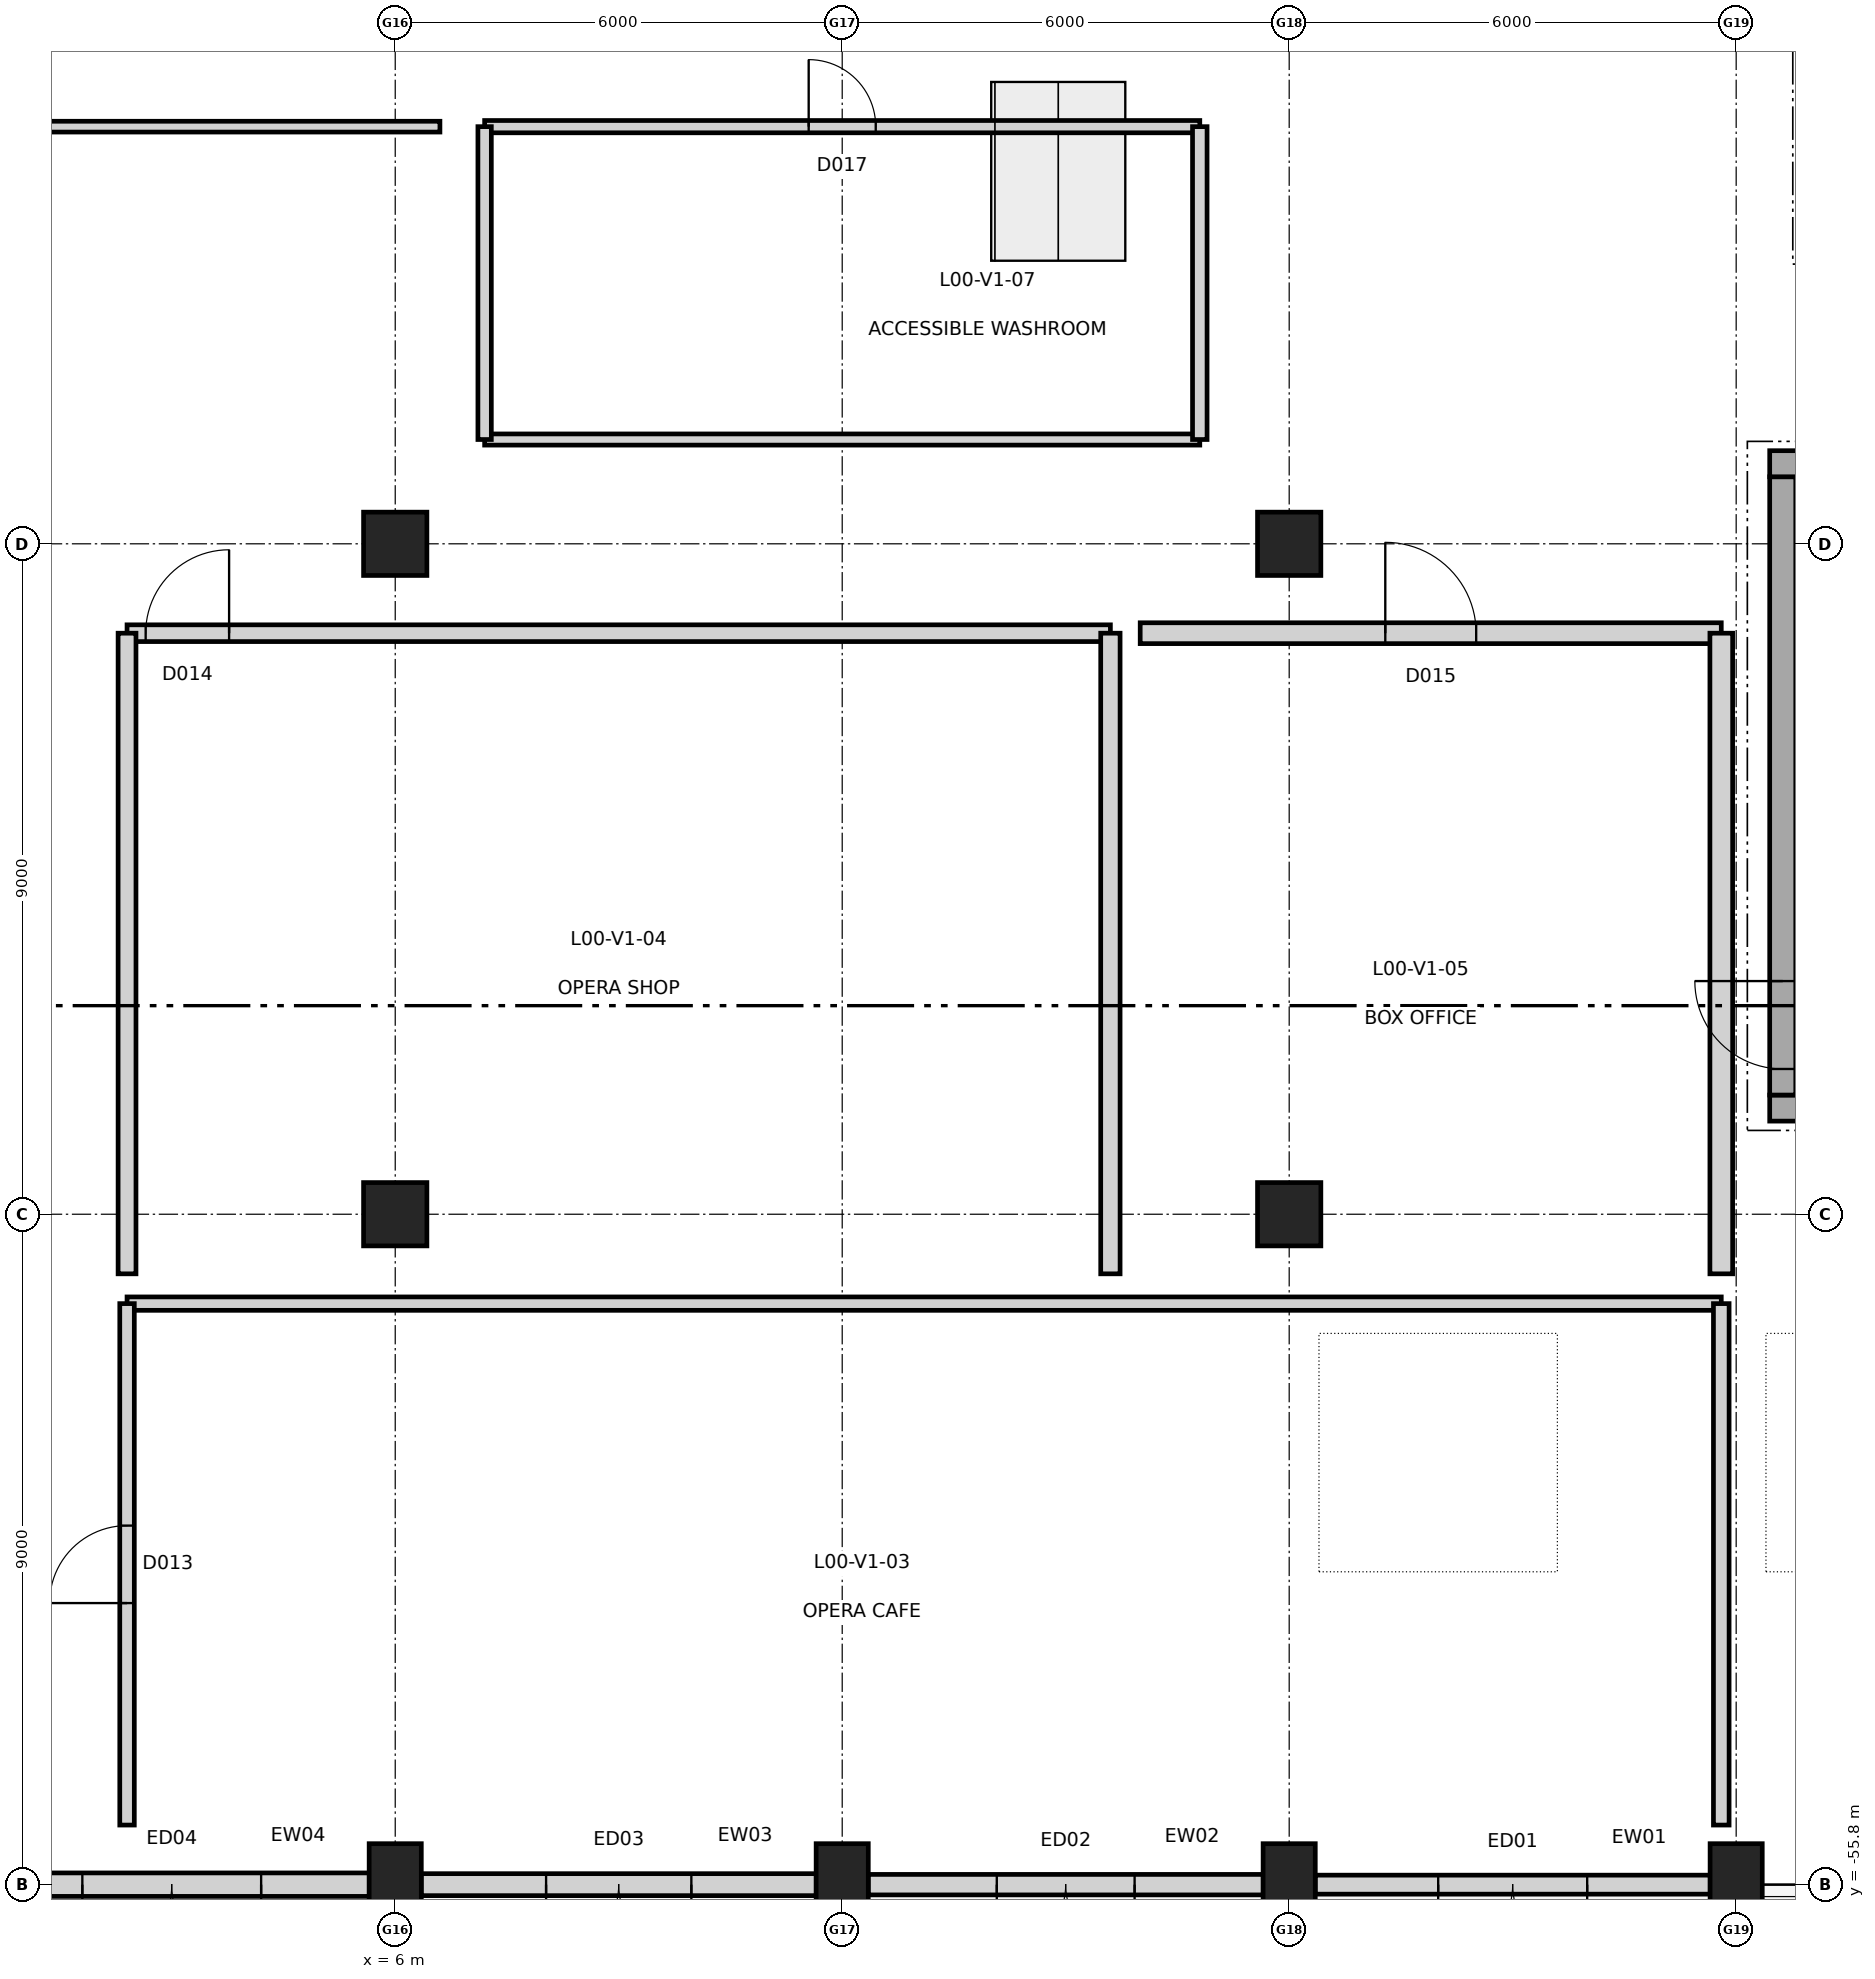
"""IFC4 building model, lengths in metres.
Left out: names, types, materials, properties, quantities, classifications, styles, units other than length and angle.
Written with IfcOpenShell. Run it as: python <this file> out.ifc"""

import sys

from ifc_helpers import new_model, si_unit, direction, frame, frame_2d, origin, origin_2d, place, context, subcontext, project, spatial, rectangle, circle, extrude, element, fill, save


model = new_model("IFC4")
c1 = context("Model", 3, precision=1e-05, world=origin(), true_north=direction((0.0, 1.0)))
c2 = subcontext(c1, "Body", "Model", "MODEL_VIEW")
j1 = project(units=[si_unit("LENGTHUNIT", "METRE"), si_unit("PLANEANGLEUNIT", "RADIAN")], contexts=[c1])
p1 = place(None, origin())
s1 = spatial("IfcSite", under=j1, at=p1, CompositionType="ELEMENT")
p2 = place(p1, origin())
s2 = spatial("IfcBuilding", under=s1, at=p2, CompositionType="ELEMENT")
p3 = place(p2, origin())
s3 = spatial("IfcBuildingStorey", under=s2, at=p3, CompositionType="ELEMENT", Elevation=0.0)
p4 = place(p3, frame((6.0, -55.8, 0.0), z_axis=(0.0, 0.0, 1.0), x_axis=(1.0, 0.0, 0.0)))
e1 = element("IfcColumn", 1, at=p4, inside=s3, PredefinedType="COLUMN", context=c2, shape_type="SweptSolid", body=[
    extrude(rectangle(XDim=0.7, YDim=1.1, at=origin_2d()), origin(), (0.0, 0.0, 1.0), 5.4),
])
for number, where, z_axis, x_axis in (
    (2, (6.0, -46.8, 0.0), (0.0, 0.0, 1.0), (1.0, 0.0, 0.0)),
    (3, (6.0, -37.8, 0.0), (0.0, 0.0, 1.0), (1.0, 0.0, 0.0)),
):
    element("IfcColumn", number, at=place(p3, frame(where, z_axis=z_axis, x_axis=x_axis)), inside=s3, PredefinedType="COLUMN", context=c2, shape_type="SweptSolid", body=[
        extrude(circle(Radius=0.425, at=origin_2d()), origin(), (0.0, 0.0, 1.0), 5.4),
    ])
for number, where, z_axis, x_axis in (
    (4, (12.0, -55.8, 0.0), (0.0, 0.0, 1.0), (1.0, 0.0, 0.0)),
    (5, (18.0, -55.8, 0.0), (0.0, 0.0, 1.0), (1.0, 0.0, 0.0)),
):
    element("IfcColumn", number, at=place(p3, frame(where, z_axis=z_axis, x_axis=x_axis)), inside=s3, PredefinedType="COLUMN", context=c2, shape_type="SweptSolid", body=[
        extrude(rectangle(XDim=0.7, YDim=1.1, at=origin_2d()), origin(), (0.0, 0.0, 1.0), 5.4),
    ])
for number, where, z_axis, x_axis in (
    (6, (18.0, -46.8, 0.0), (0.0, 0.0, 1.0), (1.0, 0.0, 0.0)),
    (7, (18.0, -37.8, 0.0), (0.0, 0.0, 1.0), (1.0, 0.0, 0.0)),
):
    element("IfcColumn", number, at=place(p3, frame(where, z_axis=z_axis, x_axis=x_axis)), inside=s3, PredefinedType="COLUMN", context=c2, shape_type="SweptSolid", body=[
        extrude(circle(Radius=0.425, at=origin_2d()), origin(), (0.0, 0.0, 1.0), 5.4),
    ])
p5 = place(p3, frame((24.0, -55.8, 0.0), z_axis=(0.0, 0.0, 1.0), x_axis=(1.0, 0.0, 0.0)))
e8 = element("IfcColumn", 8, at=p5, inside=s3, PredefinedType="COLUMN", context=c2, shape_type="SweptSolid", body=[
    extrude(rectangle(XDim=0.7, YDim=1.1, at=origin_2d()), origin(), (0.0, 0.0, 1.0), 5.4),
])
p6 = place(p3, frame((23.652, -55.8, 0.0), z_axis=(0.0, 0.0, 1.0), x_axis=(-1.0, 0.0, 0.0)))
e9 = element("IfcWall", 9, at=p6, inside=s3, PredefinedType="STANDARD", context=c2, shape_type="SweptSolid", body=[
    extrude(rectangle(XDim=5.304, YDim=0.255, at=frame_2d((2.652, 0.0))), origin(), (0.0, 0.0, 1.0), 4.32),
])
p7 = place(p6, frame((1.652, 0.0, 0.0)))
e10 = element("IfcOpeningElement", 10, at=p7, cuts=e9, PredefinedType="OPENING", context=c2, shape_type="SweptSolid", body=[
    extrude(rectangle(XDim=2.0, YDim=2.4, at=frame_2d((1.0, 1.2))), frame((0.0, 0.137, 0.0), z_axis=(0.0, -1.0, 0.0), x_axis=(1.0, 0.0, 0.0)), (0.0, 0.0, 1.0), 0.275),
])
p8 = place(p3, frame((17.652, -55.8, 0.0), z_axis=(0.0, 0.0, 1.0), x_axis=(-1.0, 0.0, 0.0)))
e11 = element("IfcWall", 11, at=p8, inside=s3, PredefinedType="STANDARD", context=c2, shape_type="SweptSolid", body=[
    extrude(rectangle(XDim=5.304, YDim=0.275, at=frame_2d((2.652, 0.0))), origin(), (0.0, 0.0, 1.0), 4.32),
])
p9 = place(p8, frame((1.727, 0.0, 0.0)))
e12 = element("IfcOpeningElement", 12, at=p9, cuts=e11, PredefinedType="OPENING", context=c2, shape_type="SweptSolid", body=[
    extrude(rectangle(XDim=1.85, YDim=2.25, at=frame_2d((0.925, 1.125))), frame((0.0, 0.147, 0.0), z_axis=(0.0, -1.0, 0.0), x_axis=(1.0, 0.0, 0.0)), (0.0, 0.0, 1.0), 0.295),
])
p10 = place(p3, frame((11.652, -55.8, 0.0), z_axis=(0.0, 0.0, 1.0), x_axis=(-1.0, 0.0, 0.0)))
e13 = element("IfcWall", 13, at=p10, inside=s3, PredefinedType="STANDARD", context=c2, shape_type="SweptSolid", body=[
    extrude(rectangle(XDim=5.304, YDim=0.295, at=frame_2d((2.652, 0.0))), origin(), (0.0, 0.0, 1.0), 4.32),
])
p11 = place(p10, frame((1.677, 0.0, 0.0)))
e14 = element("IfcOpeningElement", 14, at=p11, cuts=e13, PredefinedType="OPENING", context=c2, shape_type="SweptSolid", body=[
    extrude(rectangle(XDim=1.95, YDim=2.35, at=frame_2d((0.975, 1.175))), frame((0.0, 0.157, 0.0), z_axis=(0.0, -1.0, 0.0), x_axis=(1.0, 0.0, 0.0)), (0.0, 0.0, 1.0), 0.315),
])
p12 = place(p3, frame((5.652, -55.8, 0.0), z_axis=(0.0, 0.0, 1.0), x_axis=(-1.0, 0.0, 0.0)))
e15 = element("IfcWall", 15, at=p12, inside=s3, PredefinedType="STANDARD", context=c2, shape_type="SweptSolid", body=[
    extrude(rectangle(XDim=5.304, YDim=0.315, at=frame_2d((2.652, 0.0))), origin(), (0.0, 0.0, 1.0), 4.32),
])
p13 = place(p12, frame((1.452, 0.0, 0.0)))
e16 = element("IfcOpeningElement", 16, at=p13, cuts=e15, PredefinedType="OPENING", context=c2, shape_type="SweptSolid", body=[
    extrude(rectangle(XDim=2.4, YDim=2.5, at=frame_2d((1.2, 1.25))), frame((0.0, 0.167, 0.0), z_axis=(0.0, -1.0, 0.0), x_axis=(1.0, 0.0, 0.0)), (0.0, 0.0, 1.0), 0.335),
])
p14 = place(p3, frame((29.05, -45.375, 0.0), z_axis=(0.0, 0.0, 1.0), x_axis=(-1.0, 0.0, 0.0)))
e17 = element("IfcWall", 17, at=p14, inside=s3, PredefinedType="SHEAR", context=c2, shape_type="SweptSolid", body=[
    extrude(rectangle(XDim=4.6, YDim=0.35, at=frame_2d((2.3, 0.0))), origin(), (0.0, 0.0, 1.0), 5.4),
])
p15 = place(p3, frame((24.625, -45.2, 0.0), z_axis=(0.0, 0.0, 1.0), x_axis=(0.0, 1.0, 0.0)))
e18 = element("IfcWall", 18, at=p15, inside=s3, PredefinedType="SHEAR", context=c2, shape_type="SweptSolid", body=[
    extrude(rectangle(XDim=8.3, YDim=0.35, at=frame_2d((4.15, 0.0))), origin(), (0.0, 0.0, 1.0), 5.4),
])
p16 = place(p15, frame((0.35, 0.0, 0.0)))
e19 = element("IfcOpeningElement", 19, at=p16, cuts=e18, PredefinedType="OPENING", context=c2, shape_type="SweptSolid", body=[
    extrude(rectangle(XDim=1.18, YDim=2.15, at=frame_2d((0.59, 1.075))), frame((0.0, 0.185, 0.0), z_axis=(0.0, -1.0, 0.0), x_axis=(1.0, 0.0, 0.0)), (0.0, 0.0, 1.0), 0.37),
])
p17 = place(p3, frame((24.45, -36.725, 0.0), z_axis=(0.0, 0.0, 1.0), x_axis=(1.0, 0.0, 0.0)))
e20 = element("IfcWall", 20, at=p17, inside=s3, PredefinedType="SHEAR", context=c2, shape_type="SweptSolid", body=[
    extrude(rectangle(XDim=4.6, YDim=0.35, at=frame_2d((2.3, 0.0))), origin(), (0.0, 0.0, 1.0), 5.4),
])
p18 = place(p3, frame((2.4, -48.0, 0.0), z_axis=(0.0, 0.0, 1.0), x_axis=(1.0, 0.0, 0.0)))
e21 = element("IfcWall", 21, at=p18, inside=s3, PredefinedType="PARTITIONING", context=c2, shape_type="SweptSolid", body=[
    extrude(rectangle(XDim=21.4, YDim=0.18, at=frame_2d((10.7, 0.0))), origin(), (0.0, 0.0, 1.0), 5.02),
])
p19 = place(p3, frame((2.4, -55.0, 0.0), z_axis=(0.0, 0.0, 1.0), x_axis=(0.0, 1.0, 0.0)))
e22 = element("IfcWall", 22, at=p19, inside=s3, PredefinedType="PARTITIONING", context=c2, shape_type="SweptSolid", body=[
    extrude(rectangle(XDim=7.0, YDim=0.195, at=frame_2d((3.5, 0.0))), origin(), (0.0, 0.0, 1.0), 5.02),
])
p20 = place(p19, frame((2.98, 0.0, 0.0)))
e23 = element("IfcOpeningElement", 23, at=p20, cuts=e22, PredefinedType="OPENING", context=c2, shape_type="SweptSolid", body=[
    extrude(rectangle(XDim=1.04, YDim=2.2, at=frame_2d((0.52, 1.1))), frame((0.0, 0.107, 0.0), z_axis=(0.0, -1.0, 0.0), x_axis=(1.0, 0.0, 0.0)), (0.0, 0.0, 1.0), 0.215),
])
p21 = place(p3, frame((23.8, -55.0, 0.0), z_axis=(0.0, 0.0, 1.0), x_axis=(0.0, 1.0, 0.0)))
e24 = element("IfcWall", 24, at=p21, inside=s3, PredefinedType="PARTITIONING", context=c2, shape_type="SweptSolid", body=[
    extrude(rectangle(XDim=7.0, YDim=0.21, at=frame_2d((3.5, 0.0))), origin(), (0.0, 0.0, 1.0), 5.02),
])
p22 = place(p3, frame((2.4, -39.0, 0.0), z_axis=(0.0, 0.0, 1.0), x_axis=(1.0, 0.0, 0.0)))
e25 = element("IfcWall", 25, at=p22, inside=s3, PredefinedType="PARTITIONING", context=c2, shape_type="SweptSolid", body=[
    extrude(rectangle(XDim=13.2, YDim=0.225, at=frame_2d((6.6, 0.0))), origin(), (0.0, 0.0, 1.0), 5.02),
])
p23 = place(p22, frame((0.25, 0.0, 0.0)))
e26 = element("IfcOpeningElement", 26, at=p23, cuts=e25, PredefinedType="OPENING", context=c2, shape_type="SweptSolid", body=[
    extrude(rectangle(XDim=1.12, YDim=2.25, at=frame_2d((0.56, 1.125))), frame((0.0, 0.123, 0.0), z_axis=(0.0, -1.0, 0.0), x_axis=(1.0, 0.0, 0.0)), (0.0, 0.0, 1.0), 0.245),
])
p24 = place(p3, frame((2.4, -47.6, 0.0), z_axis=(0.0, 0.0, 1.0), x_axis=(0.0, 1.0, 0.0)))
e27 = element("IfcWall", 27, at=p24, inside=s3, PredefinedType="PARTITIONING", context=c2, shape_type="SweptSolid", body=[
    extrude(rectangle(XDim=8.6, YDim=0.24, at=frame_2d((4.3, 0.0))), origin(), (0.0, 0.0, 1.0), 5.02),
])
p25 = place(p3, frame((15.6, -47.6, 0.0), z_axis=(0.0, 0.0, 1.0), x_axis=(0.0, 1.0, 0.0)))
e28 = element("IfcWall", 28, at=p25, inside=s3, PredefinedType="PARTITIONING", context=c2, shape_type="SweptSolid", body=[
    extrude(rectangle(XDim=8.6, YDim=0.26, at=frame_2d((4.3, 0.0))), origin(), (0.0, 0.0, 1.0), 5.02),
])
p26 = place(p3, frame((16.0, -39.0, 0.0), z_axis=(0.0, 0.0, 1.0), x_axis=(1.0, 0.0, 0.0)))
e29 = element("IfcWall", 29, at=p26, inside=s3, PredefinedType="PARTITIONING", context=c2, shape_type="SweptSolid", body=[
    extrude(rectangle(XDim=7.8, YDim=0.28, at=frame_2d((3.9, 0.0))), origin(), (0.0, 0.0, 1.0), 5.02),
])
p27 = place(p26, frame((3.29, 0.0, 0.0)))
e30 = element("IfcOpeningElement", 30, at=p27, cuts=e29, PredefinedType="OPENING", context=c2, shape_type="SweptSolid", body=[
    extrude(rectangle(XDim=1.22, YDim=2.3, at=frame_2d((0.61, 1.15))), frame((0.0, 0.15, 0.0), z_axis=(0.0, -1.0, 0.0), x_axis=(1.0, 0.0, 0.0)), (0.0, 0.0, 1.0), 0.3),
])
p28 = place(p3, frame((23.8, -47.6, 0.0), z_axis=(0.0, 0.0, 1.0), x_axis=(0.0, 1.0, 0.0)))
e31 = element("IfcWall", 31, at=p28, inside=s3, PredefinedType="PARTITIONING", context=c2, shape_type="SweptSolid", body=[
    extrude(rectangle(XDim=8.6, YDim=0.305, at=frame_2d((4.3, 0.0))), origin(), (0.0, 0.0, 1.0), 5.02),
])
p29 = place(p3, frame((7.2, -36.4, 0.0), z_axis=(0.0, 0.0, 1.0), x_axis=(1.0, 0.0, 0.0)))
e32 = element("IfcWall", 32, at=p29, inside=s3, PredefinedType="PARTITIONING", context=c2, shape_type="SweptSolid", body=[
    extrude(rectangle(XDim=9.6, YDim=0.15, at=frame_2d((4.8, 0.0))), origin(), (0.0, 0.0, 1.0), 5.02),
])
p30 = place(p3, frame((7.2, -32.2, 0.0), z_axis=(0.0, 0.0, 1.0), x_axis=(1.0, 0.0, 0.0)))
e33 = element("IfcWall", 33, at=p30, inside=s3, PredefinedType="PARTITIONING", context=c2, shape_type="SweptSolid", body=[
    extrude(rectangle(XDim=9.6, YDim=0.165, at=frame_2d((4.8, 0.0))), origin(), (0.0, 0.0, 1.0), 5.02),
])
p31 = place(p30, frame((4.35, 0.0, 0.0)))
e34 = element("IfcOpeningElement", 34, at=p31, cuts=e33, PredefinedType="OPENING", context=c2, shape_type="SweptSolid", body=[
    extrude(rectangle(XDim=0.9, YDim=2.1, at=frame_2d((0.45, 1.05))), frame((0.0, 0.093, 0.0), z_axis=(0.0, -1.0, 0.0), x_axis=(1.0, 0.0, 0.0)), (0.0, 0.0, 1.0), 0.185),
])
p32 = place(p3, frame((7.2, -36.4, 0.0), z_axis=(0.0, 0.0, 1.0), x_axis=(0.0, 1.0, 0.0)))
e35 = element("IfcWall", 35, at=p32, inside=s3, PredefinedType="PARTITIONING", context=c2, shape_type="SweptSolid", body=[
    extrude(rectangle(XDim=4.2, YDim=0.18, at=frame_2d((2.1, 0.0))), origin(), (0.0, 0.0, 1.0), 5.02),
])
p33 = place(p3, frame((16.8, -36.4, 0.0), z_axis=(0.0, 0.0, 1.0), x_axis=(0.0, 1.0, 0.0)))
e36 = element("IfcWall", 36, at=p33, inside=s3, PredefinedType="PARTITIONING", context=c2, shape_type="SweptSolid", body=[
    extrude(rectangle(XDim=4.2, YDim=0.195, at=frame_2d((2.1, 0.0))), origin(), (0.0, 0.0, 1.0), 5.02),
])
p34 = place(p3, frame((-6.6, -32.2, 0.0), z_axis=(0.0, 0.0, 1.0), x_axis=(1.0, 0.0, 0.0)))
e37 = element("IfcWall", 37, at=p34, inside=s3, PredefinedType="PARTITIONING", context=c2, shape_type="SweptSolid", body=[
    extrude(rectangle(XDim=13.2, YDim=0.145, at=frame_2d((6.6, 0.0))), origin(), (0.0, 0.0, 1.0), 5.02),
])
p35 = place(p34, frame((6.07, 0.0, 0.0)))
e38 = element("IfcOpeningElement", 38, at=p35, cuts=e37, PredefinedType="OPENING", context=c2, shape_type="SweptSolid", body=[
    extrude(rectangle(XDim=1.06, YDim=2.15, at=frame_2d((0.53, 1.075))), frame((0.0, 0.083, 0.0), z_axis=(0.0, -1.0, 0.0), x_axis=(1.0, 0.0, 0.0)), (0.0, 0.0, 1.0), 0.165),
])
p36 = place(p7, origin())
e39 = element("IfcDoor", 39, at=p36, inside=s3, OperationType="DOUBLE_DOOR_SINGLE_SWING", PredefinedType="DOOR", context=c2, shape_type="SweptSolid", body=[
    extrude(rectangle(XDim=2.0, YDim=2.4, at=frame_2d((1.0, 1.2))), frame((0.0, 0.025, 0.0), z_axis=(0.0, -1.0, 0.0), x_axis=(1.0, 0.0, 0.0)), (0.0, 0.0, 1.0), 0.05),
])
fill(e10, e39)
p37 = place(p9, origin())
e40 = element("IfcDoor", 40, at=p37, inside=s3, OperationType="DOUBLE_DOOR_SINGLE_SWING", PredefinedType="DOOR", context=c2, shape_type="SweptSolid", body=[
    extrude(rectangle(XDim=1.85, YDim=2.25, at=frame_2d((0.925, 1.125))), frame((0.0, 0.025, 0.0), z_axis=(0.0, -1.0, 0.0), x_axis=(1.0, 0.0, 0.0)), (0.0, 0.0, 1.0), 0.05),
])
fill(e12, e40)
p38 = place(p11, origin())
e41 = element("IfcDoor", 41, at=p38, inside=s3, OperationType="DOUBLE_DOOR_SINGLE_SWING", PredefinedType="DOOR", context=c2, shape_type="SweptSolid", body=[
    extrude(rectangle(XDim=1.95, YDim=2.35, at=frame_2d((0.975, 1.175))), frame((0.0, 0.025, 0.0), z_axis=(0.0, -1.0, 0.0), x_axis=(1.0, 0.0, 0.0)), (0.0, 0.0, 1.0), 0.05),
])
fill(e14, e41)
p39 = place(p13, origin())
e42 = element("IfcDoor", 42, at=p39, inside=s3, OperationType="DOUBLE_DOOR_SINGLE_SWING", PredefinedType="DOOR", context=c2, shape_type="SweptSolid", body=[
    extrude(rectangle(XDim=2.4, YDim=2.5, at=frame_2d((1.2, 1.25))), frame((0.0, 0.025, 0.0), z_axis=(0.0, -1.0, 0.0), x_axis=(1.0, 0.0, 0.0)), (0.0, 0.0, 1.0), 0.05),
])
fill(e16, e42)
p40 = place(p16, origin())
e43 = element("IfcDoor", 43, at=p40, inside=s3, OperationType="SINGLE_SWING_RIGHT", PredefinedType="DOOR", context=c2, shape_type="SweptSolid", body=[
    extrude(rectangle(XDim=1.18, YDim=2.15, at=frame_2d((0.59, 1.075))), frame((0.0, 0.025, 0.0), z_axis=(0.0, -1.0, 0.0), x_axis=(1.0, 0.0, 0.0)), (0.0, 0.0, 1.0), 0.05),
])
fill(e19, e43)
p41 = place(p20, origin())
e44 = element("IfcDoor", 44, at=p41, inside=s3, OperationType="SINGLE_SWING_LEFT", PredefinedType="DOOR", context=c2, shape_type="SweptSolid", body=[
    extrude(rectangle(XDim=1.04, YDim=2.2, at=frame_2d((0.52, 1.1))), frame((0.0, 0.025, 0.0), z_axis=(0.0, -1.0, 0.0), x_axis=(1.0, 0.0, 0.0)), (0.0, 0.0, 1.0), 0.05),
])
fill(e23, e44)
p42 = place(p23, origin())
e45 = element("IfcDoor", 45, at=p42, inside=s3, OperationType="SINGLE_SWING_RIGHT", PredefinedType="DOOR", context=c2, shape_type="SweptSolid", body=[
    extrude(rectangle(XDim=1.12, YDim=2.25, at=frame_2d((0.56, 1.125))), frame((0.0, 0.025, 0.0), z_axis=(0.0, -1.0, 0.0), x_axis=(1.0, 0.0, 0.0)), (0.0, 0.0, 1.0), 0.05),
])
fill(e26, e45)
p43 = place(p27, origin())
e46 = element("IfcDoor", 46, at=p43, inside=s3, OperationType="SINGLE_SWING_LEFT", PredefinedType="DOOR", context=c2, shape_type="SweptSolid", body=[
    extrude(rectangle(XDim=1.22, YDim=2.3, at=frame_2d((0.61, 1.15))), frame((0.0, 0.025, 0.0), z_axis=(0.0, -1.0, 0.0), x_axis=(1.0, 0.0, 0.0)), (0.0, 0.0, 1.0), 0.05),
])
fill(e30, e46)
p44 = place(p31, origin())
e47 = element("IfcDoor", 47, at=p44, inside=s3, OperationType="SINGLE_SWING_LEFT", PredefinedType="DOOR", context=c2, shape_type="SweptSolid", body=[
    extrude(rectangle(XDim=0.9, YDim=2.1, at=frame_2d((0.45, 1.05))), frame((0.0, 0.025, 0.0), z_axis=(0.0, -1.0, 0.0), x_axis=(1.0, 0.0, 0.0)), (0.0, 0.0, 1.0), 0.05),
])
fill(e34, e47)
save(model, sys.argv[1])
